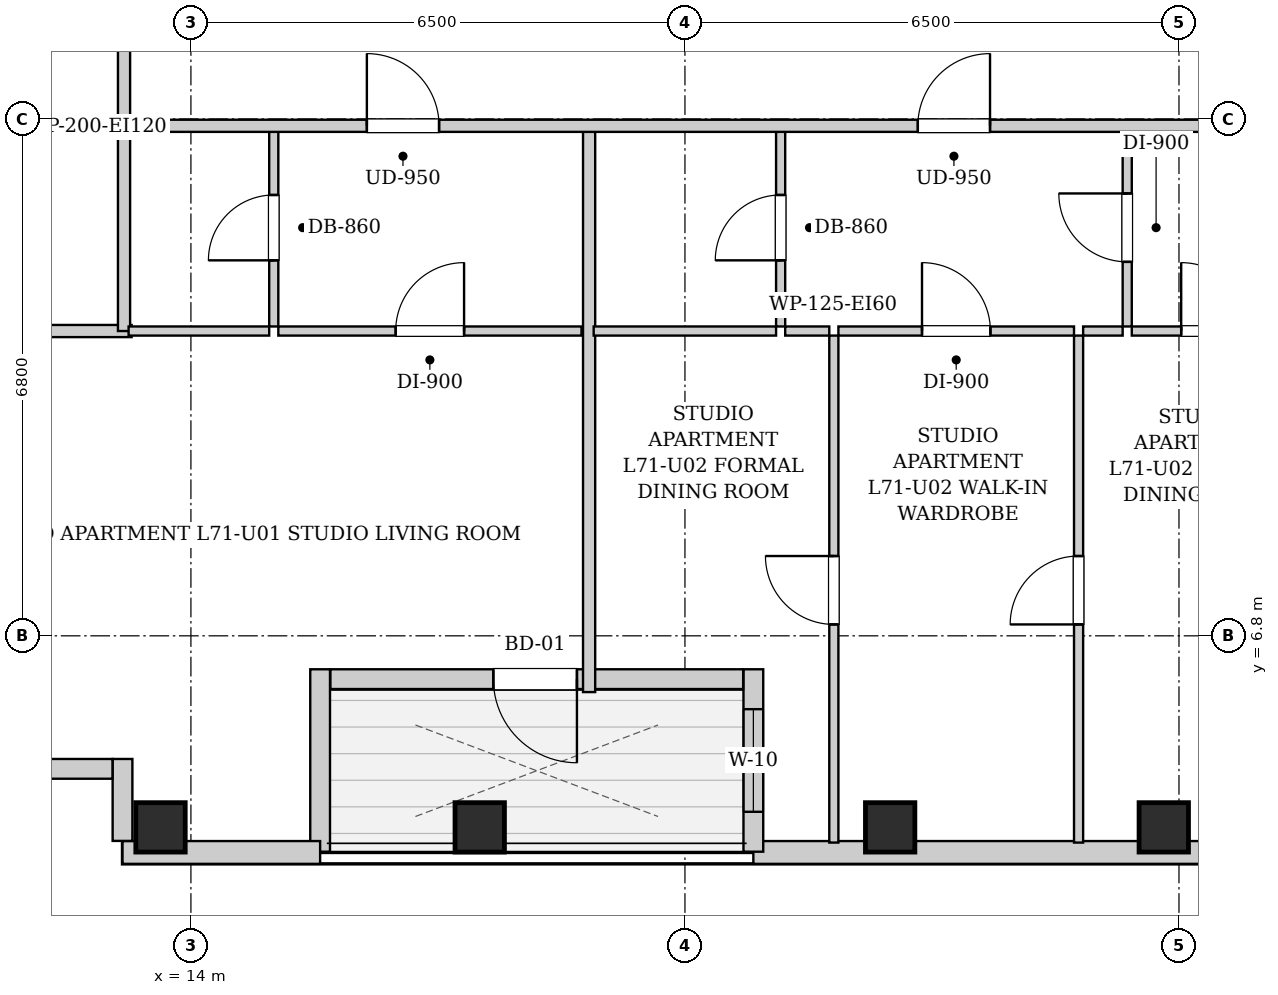
"""IFC4 building model, lengths in metres.
Left out: names, types, materials, properties, quantities, classifications, styles, units other than length and angle.
Written with IfcOpenShell. Run it as: python <this file> out.ifc"""

import sys

from ifc_helpers import new_model, si_unit, direction, frame, frame_2d, origin, origin_2d, place, context, subcontext, project, spatial, rectangle, extrude, element, fill, save


model = new_model("IFC4")
c1 = context("Model", 3, precision=1e-05, world=origin(), true_north=direction((0.0, 1.0)))
c2 = subcontext(c1, "Body", "Model", "MODEL_VIEW")
j1 = project(units=[si_unit("LENGTHUNIT", "METRE"), si_unit("PLANEANGLEUNIT", "RADIAN")], contexts=[c1])
p1 = place(None, origin())
s1 = spatial("IfcSite", under=j1, at=p1, CompositionType="ELEMENT")
p2 = place(p1, origin())
s2 = spatial("IfcBuilding", under=s1, at=p2, CompositionType="ELEMENT")
p3 = place(p2, frame((0.0, 0.0, 244.5)))
s3 = spatial("IfcBuildingStorey", under=s2, at=p3, CompositionType="ELEMENT", Elevation=244.5)
for number, where, z_axis, x_axis in (
    (1, (13.6, 4.28, 0.0), (0.0, 0.0, 1.0), (1.0, 0.0, 0.0)),
    (2, (17.8, 4.28, 0.0), (0.0, 0.0, 1.0), (1.0, 0.0, 0.0)),
    (3, (23.2, 4.28, 0.0), (0.0, 0.0, 1.0), (1.0, 0.0, 0.0)),
    (4, (26.8, 4.28, 0.0), (0.0, 0.0, 1.0), (1.0, 0.0, 0.0)),
):
    element("IfcColumn", number, at=place(p3, frame(where, z_axis=z_axis, x_axis=x_axis)), inside=s3, PredefinedType="COLUMN", context=c2, shape_type="SweptSolid", body=[
        extrude(rectangle(XDim=0.65, YDim=0.65, at=origin_2d()), origin(), (0.0, 0.0, 1.0), 3.4),
    ])
p4 = place(p3, frame((31.5, 3.95, 0.0), z_axis=(0.0, 0.0, 1.0), x_axis=(-1.0, 0.0, 0.0)))
e5 = element("IfcWall", 5, at=p4, inside=s3, PredefinedType="SOLIDWALL", context=c2, shape_type="SweptSolid", body=[
    extrude(rectangle(XDim=10.1, YDim=0.3, at=frame_2d((5.05, 0.0))), origin(), (0.0, 0.0, 1.0), 3.14),
])
p5 = place(p4, frame((3.15, 0.0, 0.55)))
e6 = element("IfcOpeningElement", 6, at=p5, cuts=e5, PredefinedType="OPENING", context=c2, shape_type="SweptSolid", body=[
    extrude(rectangle(XDim=0.85, YDim=1.2, at=frame_2d((0.425, 0.6))), frame((0.0, 0.16, 0.0), z_axis=(0.0, -1.0, 0.0), x_axis=(1.0, 0.0, 0.0)), (0.0, 0.0, 1.0), 0.32),
])
p6 = place(p4, frame((0.757, 0.0, 0.55)))
e7 = element("IfcOpeningElement", 7, at=p6, cuts=e5, PredefinedType="OPENING", context=c2, shape_type="SweptSolid", body=[
    extrude(rectangle(XDim=1.35, YDim=1.2, at=frame_2d((0.675, 0.6))), frame((0.0, 0.16, 0.0), z_axis=(0.0, -1.0, 0.0), x_axis=(1.0, 0.0, 0.0)), (0.0, 0.0, 1.0), 0.32),
])
p7 = place(p3, frame((21.4, 3.96, 0.0), z_axis=(0.0, 0.0, 1.0), x_axis=(0.0, 1.0, 0.0)))
e8 = element("IfcWall", 8, at=p7, inside=s3, PredefinedType="SOLIDWALL", context=c2, shape_type="SweptSolid", body=[
    extrude(rectangle(XDim=2.4, YDim=0.26, at=frame_2d((1.2, 0.0))), origin(), (0.0, 0.0, 1.0), 3.14),
])
p8 = place(p7, frame((0.525, 0.0, 0.55)))
e9 = element("IfcOpeningElement", 9, at=p8, cuts=e8, PredefinedType="OPENING", context=c2, shape_type="SweptSolid", body=[
    extrude(rectangle(XDim=1.35, YDim=1.2, at=frame_2d((0.675, 0.6))), frame((0.0, 0.14, 0.0), z_axis=(0.0, -1.0, 0.0), x_axis=(1.0, 0.0, 0.0)), (0.0, 0.0, 1.0), 0.28),
])
p9 = place(p3, frame((21.266, 6.23, 0.0), z_axis=(0.0, 0.0, 1.0), x_axis=(-1.0, 0.0, 0.0)))
e10 = element("IfcWall", 10, at=p9, inside=s3, PredefinedType="SOLIDWALL", context=c2, shape_type="SweptSolid", body=[
    extrude(rectangle(XDim=5.432, YDim=0.26, at=frame_2d((2.716, 0.0))), origin(), (0.0, 0.0, 1.0), 3.14),
])
p10 = place(p9, frame((2.187, 0.0, 0.0)))
e11 = element("IfcOpeningElement", 11, at=p10, cuts=e10, PredefinedType="OPENING", context=c2, shape_type="SweptSolid", body=[
    extrude(rectangle(XDim=1.1, YDim=2.0, at=frame_2d((0.55, 1.0))), frame((0.0, 0.14, 0.0), z_axis=(0.0, -1.0, 0.0), x_axis=(1.0, 0.0, 0.0)), (0.0, 0.0, 1.0), 0.28),
])
p11 = place(p3, frame((15.7, 6.36, 0.0), z_axis=(0.0, 0.0, 1.0), x_axis=(0.0, -1.0, 0.0)))
e12 = element("IfcWall", 12, at=p11, inside=s3, PredefinedType="SOLIDWALL", context=c2, shape_type="SweptSolid", body=[
    extrude(rectangle(XDim=2.4, YDim=0.26, at=frame_2d((1.2, 0.0))), origin(), (0.0, 0.0, 1.0), 3.14),
])
p12 = place(p3, frame((15.7, 3.95, 0.0), z_axis=(0.0, 0.0, 1.0), x_axis=(-1.0, 0.0, 0.0)))
e13 = element("IfcWall", 13, at=p12, inside=s3, PredefinedType="SOLIDWALL", context=c2, shape_type="SweptSolid", body=[
    extrude(rectangle(XDim=2.6, YDim=0.3, at=frame_2d((1.3, 0.0))), origin(), (0.0, 0.0, 1.0), 3.14),
])
p13 = place(p3, frame((13.1, 4.102, 0.0), z_axis=(0.0, 0.0, 1.0), x_axis=(0.0, 1.0, 0.0)))
e14 = element("IfcWall", 14, at=p13, inside=s3, PredefinedType="SOLIDWALL", context=c2, shape_type="SweptSolid", body=[
    extrude(rectangle(XDim=1.078, YDim=0.26, at=frame_2d((0.539, 0.0))), origin(), (0.0, 0.0, 1.0), 3.14),
])
p14 = place(p3, frame((12.968, 5.05, 0.0), z_axis=(0.0, 0.0, 1.0), x_axis=(-1.0, 0.0, 0.0)))
e15 = element("IfcWall", 15, at=p14, inside=s3, PredefinedType="SOLIDWALL", context=c2, shape_type="SweptSolid", body=[
    extrude(rectangle(XDim=1.248, YDim=0.26, at=frame_2d((0.624, 0.0))), origin(), (0.0, 0.0, 1.0), 3.14),
])
p15 = place(p3, frame((13.12, 13.51, 0.0), z_axis=(0.0, 0.0, 1.0), x_axis=(0.0, 1.0, 0.0)))
e16 = element("IfcWall", 16, at=p15, inside=s3, PredefinedType="PARTITIONING", context=c2, shape_type="SweptSolid", body=[
    extrude(rectangle(XDim=1.58, YDim=0.16, at=frame_2d((0.79, 0.0))), origin(), (0.0, 0.0, 1.0), 3.14),
])
p16 = place(p3, frame((10.88, 10.81, 0.0), z_axis=(0.0, 0.0, 1.0), x_axis=(1.0, 0.0, 0.0)))
e17 = element("IfcWall", 17, at=p16, inside=s3, PredefinedType="PARTITIONING", context=c2, shape_type="SweptSolid", body=[
    extrude(rectangle(XDim=2.34, YDim=0.16, at=frame_2d((1.17, 0.0))), origin(), (0.0, 0.0, 1.0), 3.14),
])
p17 = place(p3, frame((13.12, 10.81, 0.0), z_axis=(0.0, 0.0, 1.0), x_axis=(0.0, 1.0, 0.0)))
e18 = element("IfcWall", 18, at=p17, inside=s3, PredefinedType="PARTITIONING", context=c2, shape_type="SweptSolid", body=[
    extrude(rectangle(XDim=2.66, YDim=0.16, at=frame_2d((1.33, 0.0))), origin(), (0.0, 0.0, 1.0), 3.14),
])
p18 = place(p3, frame((15.09, 10.87, 0.0), z_axis=(0.0, 0.0, 1.0), x_axis=(0.0, 1.0, 0.0)))
e19 = element("IfcWall", 19, at=p18, inside=s3, PredefinedType="PARTITIONING", context=c2, shape_type="SweptSolid", body=[
    extrude(rectangle(XDim=2.6, YDim=0.12, at=frame_2d((1.3, 0.0))), origin(), (0.0, 0.0, 1.0), 3.14),
])
p19 = place(p18, frame((0.87, 0.0, 0.0)))
e20 = element("IfcOpeningElement", 20, at=p19, cuts=e19, PredefinedType="OPENING", context=c2, shape_type="SweptSolid", body=[
    extrude(rectangle(XDim=0.86, YDim=2.05, at=frame_2d((0.43, 1.025))), frame((0.0, 0.07, 0.0), z_axis=(0.0, -1.0, 0.0), x_axis=(1.0, 0.0, 0.0)), (0.0, 0.0, 1.0), 0.14),
])
p20 = place(p3, frame((13.18, 10.81, 0.0), z_axis=(0.0, 0.0, 1.0), x_axis=(1.0, 0.0, 0.0)))
e21 = element("IfcWall", 21, at=p20, inside=s3, PredefinedType="PARTITIONING", context=c2, shape_type="SweptSolid", body=[
    extrude(rectangle(XDim=1.85, YDim=0.12, at=frame_2d((0.925, 0.0))), origin(), (0.0, 0.0, 1.0), 3.14),
])
p21 = place(p3, frame((15.15, 10.81, 0.0), z_axis=(0.0, 0.0, 1.0), x_axis=(1.0, 0.0, 0.0)))
e22 = element("IfcWall", 22, at=p21, inside=s3, PredefinedType="PARTITIONING", context=c2, shape_type="SweptSolid", body=[
    extrude(rectangle(XDim=3.989, YDim=0.12, at=frame_2d((1.995, 0.0))), origin(), (0.0, 0.0, 1.0), 3.14),
])
p22 = place(p21, frame((1.544, 0.0, 0.0)))
e23 = element("IfcOpeningElement", 23, at=p22, cuts=e22, PredefinedType="OPENING", context=c2, shape_type="SweptSolid", body=[
    extrude(rectangle(XDim=0.9, YDim=2.05, at=frame_2d((0.45, 1.025))), frame((0.0, 0.07, 0.0), z_axis=(0.0, -1.0, 0.0), x_axis=(1.0, 0.0, 0.0)), (0.0, 0.0, 1.0), 0.14),
])
p23 = place(p3, frame((19.239, 6.06, 0.0), z_axis=(0.0, 0.0, 1.0), x_axis=(0.0, 1.0, 0.0)))
e24 = element("IfcWall", 24, at=p23, inside=s3, PredefinedType="PARTITIONING", context=c2, shape_type="SweptSolid", body=[
    extrude(rectangle(XDim=7.41, YDim=0.16, at=frame_2d((3.705, 0.0))), origin(), (0.0, 0.0, 1.0), 3.14),
])
p24 = place(p3, frame((21.759, 10.87, 0.0), z_axis=(0.0, 0.0, 1.0), x_axis=(0.0, 1.0, 0.0)))
e25 = element("IfcWall", 25, at=p24, inside=s3, PredefinedType="PARTITIONING", context=c2, shape_type="SweptSolid", body=[
    extrude(rectangle(XDim=2.6, YDim=0.12, at=frame_2d((1.3, 0.0))), origin(), (0.0, 0.0, 1.0), 3.14),
])
p25 = place(p24, frame((0.87, 0.0, 0.0)))
e26 = element("IfcOpeningElement", 26, at=p25, cuts=e25, PredefinedType="OPENING", context=c2, shape_type="SweptSolid", body=[
    extrude(rectangle(XDim=0.86, YDim=2.05, at=frame_2d((0.43, 1.025))), frame((0.0, 0.07, 0.0), z_axis=(0.0, -1.0, 0.0), x_axis=(1.0, 0.0, 0.0)), (0.0, 0.0, 1.0), 0.14),
])
p26 = place(p3, frame((19.299, 10.81, 0.0), z_axis=(0.0, 0.0, 1.0), x_axis=(1.0, 0.0, 0.0)))
e27 = element("IfcWall", 27, at=p26, inside=s3, PredefinedType="PARTITIONING", context=c2, shape_type="SweptSolid", body=[
    extrude(rectangle(XDim=2.4, YDim=0.12, at=frame_2d((1.2, 0.0))), origin(), (0.0, 0.0, 1.0), 3.14),
])
p27 = place(p3, frame((26.319, 10.87, 0.0), z_axis=(0.0, 0.0, 1.0), x_axis=(0.0, 1.0, 0.0)))
e28 = element("IfcWall", 28, at=p27, inside=s3, PredefinedType="PARTITIONING", context=c2, shape_type="SweptSolid", body=[
    extrude(rectangle(XDim=2.6, YDim=0.12, at=frame_2d((1.3, 0.0))), origin(), (0.0, 0.0, 1.0), 3.14),
])
p28 = place(p27, frame((0.85, 0.0, 0.0)))
e29 = element("IfcOpeningElement", 29, at=p28, cuts=e28, PredefinedType="OPENING", context=c2, shape_type="SweptSolid", body=[
    extrude(rectangle(XDim=0.9, YDim=2.05, at=frame_2d((0.45, 1.025))), frame((0.0, 0.07, 0.0), z_axis=(0.0, -1.0, 0.0), x_axis=(1.0, 0.0, 0.0)), (0.0, 0.0, 1.0), 0.14),
])
p29 = place(p3, frame((21.819, 10.81, 0.0), z_axis=(0.0, 0.0, 1.0), x_axis=(1.0, 0.0, 0.0)))
e30 = element("IfcWall", 30, at=p29, inside=s3, PredefinedType="PARTITIONING", context=c2, shape_type="SweptSolid", body=[
    extrude(rectangle(XDim=0.58, YDim=0.12, at=frame_2d((0.29, 0.0))), origin(), (0.0, 0.0, 1.0), 3.14),
])
p30 = place(p3, frame((22.519, 10.81, 0.0), z_axis=(0.0, 0.0, 1.0), x_axis=(1.0, 0.0, 0.0)))
e31 = element("IfcWall", 31, at=p30, inside=s3, PredefinedType="PARTITIONING", context=c2, shape_type="SweptSolid", body=[
    extrude(rectangle(XDim=3.1, YDim=0.12, at=frame_2d((1.55, 0.0))), origin(), (0.0, 0.0, 1.0), 3.14),
])
p31 = place(p30, frame((1.1, 0.0, 0.0)))
e32 = element("IfcOpeningElement", 32, at=p31, cuts=e31, PredefinedType="OPENING", context=c2, shape_type="SweptSolid", body=[
    extrude(rectangle(XDim=0.9, YDim=2.05, at=frame_2d((0.45, 1.025))), frame((0.0, 0.07, 0.0), z_axis=(0.0, -1.0, 0.0), x_axis=(1.0, 0.0, 0.0)), (0.0, 0.0, 1.0), 0.14),
])
p32 = place(p3, frame((25.739, 10.81, 0.0), z_axis=(0.0, 0.0, 1.0), x_axis=(1.0, 0.0, 0.0)))
e33 = element("IfcWall", 33, at=p32, inside=s3, PredefinedType="PARTITIONING", context=c2, shape_type="SweptSolid", body=[
    extrude(rectangle(XDim=0.52, YDim=0.12, at=frame_2d((0.26, 0.0))), origin(), (0.0, 0.0, 1.0), 3.14),
])
p33 = place(p3, frame((26.379, 10.81, 0.0), z_axis=(0.0, 0.0, 1.0), x_axis=(1.0, 0.0, 0.0)))
e34 = element("IfcWall", 34, at=p33, inside=s3, PredefinedType="PARTITIONING", context=c2, shape_type="SweptSolid", body=[
    extrude(rectangle(XDim=2.2, YDim=0.12, at=frame_2d((1.1, 0.0))), origin(), (0.0, 0.0, 1.0), 3.14),
])
p34 = place(p33, frame((0.65, 0.0, 0.0)))
e35 = element("IfcOpeningElement", 35, at=p34, cuts=e34, PredefinedType="OPENING", context=c2, shape_type="SweptSolid", body=[
    extrude(rectangle(XDim=0.9, YDim=2.05, at=frame_2d((0.45, 1.025))), frame((0.0, 0.07, 0.0), z_axis=(0.0, -1.0, 0.0), x_axis=(1.0, 0.0, 0.0)), (0.0, 0.0, 1.0), 0.14),
])
p35 = place(p3, frame((22.459, 4.08, 0.0), z_axis=(0.0, 0.0, 1.0), x_axis=(0.0, 1.0, 0.0)))
e36 = element("IfcWall", 36, at=p35, inside=s3, PredefinedType="PARTITIONING", context=c2, shape_type="SweptSolid", body=[
    extrude(rectangle(XDim=6.67, YDim=0.12, at=frame_2d((3.335, 0.0))), origin(), (0.0, 0.0, 1.0), 3.14),
])
p36 = place(p35, frame((2.87, 0.0, 0.0)))
e37 = element("IfcOpeningElement", 37, at=p36, cuts=e36, PredefinedType="OPENING", context=c2, shape_type="SweptSolid", body=[
    extrude(rectangle(XDim=0.9, YDim=2.05, at=frame_2d((0.45, 1.025))), frame((0.0, 0.07, 0.0), z_axis=(0.0, -1.0, 0.0), x_axis=(1.0, 0.0, 0.0)), (0.0, 0.0, 1.0), 0.14),
])
p37 = place(p3, frame((25.679, 4.08, 0.0), z_axis=(0.0, 0.0, 1.0), x_axis=(0.0, 1.0, 0.0)))
e38 = element("IfcWall", 38, at=p37, inside=s3, PredefinedType="PARTITIONING", context=c2, shape_type="SweptSolid", body=[
    extrude(rectangle(XDim=6.67, YDim=0.12, at=frame_2d((3.335, 0.0))), origin(), (0.0, 0.0, 1.0), 3.14),
])
p38 = place(p37, frame((2.87, 0.0, 0.0)))
e39 = element("IfcOpeningElement", 39, at=p38, cuts=e38, PredefinedType="OPENING", context=c2, shape_type="SweptSolid", body=[
    extrude(rectangle(XDim=0.9, YDim=2.05, at=frame_2d((0.45, 1.025))), frame((0.0, 0.07, 0.0), z_axis=(0.0, -1.0, 0.0), x_axis=(1.0, 0.0, 0.0)), (0.0, 0.0, 1.0), 0.14),
])
p39 = place(p3, frame((13.15, 13.51, 0.0), z_axis=(0.0, 0.0, 1.0), x_axis=(1.0, 0.0, 0.0)))
e40 = element("IfcWall", 40, at=p39, inside=s3, PredefinedType="PARTITIONING", context=c2, shape_type="SweptSolid", body=[
    extrude(rectangle(XDim=24.6, YDim=0.16, at=frame_2d((12.3, 0.0))), origin(), (0.0, 0.0, 1.0), 3.14),
])
p40 = place(p39, frame((3.165, 0.0, 0.0)))
e41 = element("IfcOpeningElement", 41, at=p40, cuts=e40, PredefinedType="OPENING", context=c2, shape_type="SweptSolid", body=[
    extrude(rectangle(XDim=0.95, YDim=2.1, at=frame_2d((0.475, 1.05))), frame((0.0, 0.09, 0.0), z_axis=(0.0, -1.0, 0.0), x_axis=(1.0, 0.0, 0.0)), (0.0, 0.0, 1.0), 0.18),
])
p41 = place(p39, frame((10.414, 0.0, 0.0)))
e42 = element("IfcOpeningElement", 42, at=p41, cuts=e40, PredefinedType="OPENING", context=c2, shape_type="SweptSolid", body=[
    extrude(rectangle(XDim=0.95, YDim=2.1, at=frame_2d((0.475, 1.05))), frame((0.0, 0.09, 0.0), z_axis=(0.0, -1.0, 0.0), x_axis=(1.0, 0.0, 0.0)), (0.0, 0.0, 1.0), 0.18),
])
p42 = place(p19, origin())
e43 = element("IfcDoor", 43, at=p42, inside=s3, OperationType="SINGLE_SWING_LEFT", PredefinedType="DOOR", context=c2, shape_type="SweptSolid", body=[
    extrude(rectangle(XDim=0.86, YDim=2.05, at=frame_2d((0.43, 1.025))), frame((0.0, 0.025, 0.0), z_axis=(0.0, -1.0, 0.0), x_axis=(1.0, 0.0, 0.0)), (0.0, 0.0, 1.0), 0.05),
])
fill(e20, e43)
p43 = place(p22, origin())
e44 = element("IfcDoor", 44, at=p43, inside=s3, OperationType="SINGLE_SWING_RIGHT", PredefinedType="DOOR", context=c2, shape_type="SweptSolid", body=[
    extrude(rectangle(XDim=0.9, YDim=2.05, at=frame_2d((0.45, 1.025))), frame((0.0, 0.025, 0.0), z_axis=(0.0, -1.0, 0.0), x_axis=(1.0, 0.0, 0.0)), (0.0, 0.0, 1.0), 0.05),
])
fill(e23, e44)
p44 = place(p25, origin())
e45 = element("IfcDoor", 45, at=p44, inside=s3, OperationType="SINGLE_SWING_LEFT", PredefinedType="DOOR", context=c2, shape_type="SweptSolid", body=[
    extrude(rectangle(XDim=0.86, YDim=2.05, at=frame_2d((0.43, 1.025))), frame((0.0, 0.025, 0.0), z_axis=(0.0, -1.0, 0.0), x_axis=(1.0, 0.0, 0.0)), (0.0, 0.0, 1.0), 0.05),
])
fill(e26, e45)
p45 = place(p28, origin())
e46 = element("IfcDoor", 46, at=p45, inside=s3, OperationType="SINGLE_SWING_RIGHT", PredefinedType="DOOR", context=c2, shape_type="SweptSolid", body=[
    extrude(rectangle(XDim=0.9, YDim=2.05, at=frame_2d((0.45, 1.025))), frame((0.0, 0.025, 0.0), z_axis=(0.0, -1.0, 0.0), x_axis=(1.0, 0.0, 0.0)), (0.0, 0.0, 1.0), 0.05),
])
fill(e29, e46)
p46 = place(p31, origin())
e47 = element("IfcDoor", 47, at=p46, inside=s3, OperationType="SINGLE_SWING_LEFT", PredefinedType="DOOR", context=c2, shape_type="SweptSolid", body=[
    extrude(rectangle(XDim=0.9, YDim=2.05, at=frame_2d((0.45, 1.025))), frame((0.0, 0.025, 0.0), z_axis=(0.0, -1.0, 0.0), x_axis=(1.0, 0.0, 0.0)), (0.0, 0.0, 1.0), 0.05),
])
fill(e32, e47)
p47 = place(p34, origin())
e48 = element("IfcDoor", 48, at=p47, inside=s3, OperationType="SINGLE_SWING_LEFT", PredefinedType="DOOR", context=c2, shape_type="SweptSolid", body=[
    extrude(rectangle(XDim=0.9, YDim=2.05, at=frame_2d((0.45, 1.025))), frame((0.0, 0.025, 0.0), z_axis=(0.0, -1.0, 0.0), x_axis=(1.0, 0.0, 0.0)), (0.0, 0.0, 1.0), 0.05),
])
fill(e35, e48)
p48 = place(p36, origin())
e49 = element("IfcDoor", 49, at=p48, inside=s3, OperationType="SINGLE_SWING_RIGHT", PredefinedType="DOOR", context=c2, shape_type="SweptSolid", body=[
    extrude(rectangle(XDim=0.9, YDim=2.05, at=frame_2d((0.45, 1.025))), frame((0.0, 0.025, 0.0), z_axis=(0.0, -1.0, 0.0), x_axis=(1.0, 0.0, 0.0)), (0.0, 0.0, 1.0), 0.05),
])
fill(e37, e49)
p49 = place(p38, origin())
e50 = element("IfcDoor", 50, at=p49, inside=s3, OperationType="SINGLE_SWING_LEFT", PredefinedType="DOOR", context=c2, shape_type="SweptSolid", body=[
    extrude(rectangle(XDim=0.9, YDim=2.05, at=frame_2d((0.45, 1.025))), frame((0.0, 0.025, 0.0), z_axis=(0.0, -1.0, 0.0), x_axis=(1.0, 0.0, 0.0)), (0.0, 0.0, 1.0), 0.05),
])
fill(e39, e50)
p50 = place(p40, origin())
e51 = element("IfcDoor", 51, at=p50, inside=s3, OperationType="SINGLE_SWING_LEFT", PredefinedType="DOOR", context=c2, shape_type="SweptSolid", body=[
    extrude(rectangle(XDim=0.95, YDim=2.1, at=frame_2d((0.475, 1.05))), frame((0.0, 0.025, 0.0), z_axis=(0.0, -1.0, 0.0), x_axis=(1.0, 0.0, 0.0)), (0.0, 0.0, 1.0), 0.05),
])
fill(e41, e51)
p51 = place(p41, origin())
e52 = element("IfcDoor", 52, at=p51, inside=s3, OperationType="SINGLE_SWING_RIGHT", PredefinedType="DOOR", context=c2, shape_type="SweptSolid", body=[
    extrude(rectangle(XDim=0.95, YDim=2.1, at=frame_2d((0.475, 1.05))), frame((0.0, 0.025, 0.0), z_axis=(0.0, -1.0, 0.0), x_axis=(1.0, 0.0, 0.0)), (0.0, 0.0, 1.0), 0.05),
])
fill(e42, e52)
p52 = place(p10, origin())
e53 = element("IfcDoor", 53, at=p52, inside=s3, OperationType="SINGLE_SWING_LEFT", PredefinedType="DOOR", context=c2, shape_type="SweptSolid", body=[
    extrude(rectangle(XDim=1.1, YDim=2.0, at=frame_2d((0.55, 1.0))), frame((0.0, 0.025, 0.0), z_axis=(0.0, -1.0, 0.0), x_axis=(1.0, 0.0, 0.0)), (0.0, 0.0, 1.0), 0.05),
])
fill(e11, e53)
p53 = place(p8, origin())
e54 = element("IfcWindow", 54, at=p53, inside=s3, PartitioningType="SINGLE_PANEL", PredefinedType="WINDOW", context=c2, shape_type="SweptSolid", body=[
    extrude(rectangle(XDim=1.35, YDim=1.2, at=frame_2d((0.675, 0.6))), frame((0.0, 0.03, 0.0), z_axis=(0.0, -1.0, 0.0), x_axis=(1.0, 0.0, 0.0)), (0.0, 0.0, 1.0), 0.06),
])
fill(e9, e54)
save(model, sys.argv[1])
